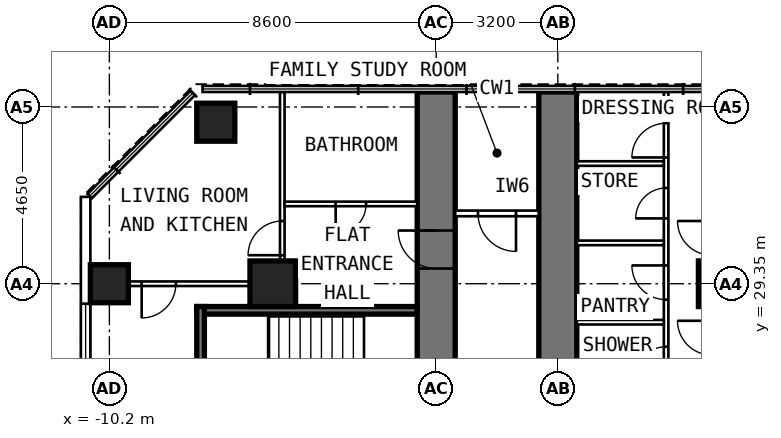
"""IFC4 building model, lengths in metres.
Left out: names, types, materials, properties, quantities, classifications, styles, units other than length and angle.
Written with IfcOpenShell. Run it as: python <this file> out.ifc"""

import sys

from ifc_helpers import new_model, si_unit, direction, frame, frame_2d, origin, origin_2d, place, context, subcontext, project, spatial, rectangle, extrude, element, fill, save


model = new_model("IFC4")
c1 = context("Model", 3, precision=1e-05, world=origin(), true_north=direction((0.0, 1.0)))
c2 = subcontext(c1, "Body", "Model", "MODEL_VIEW")
j1 = project(units=[si_unit("LENGTHUNIT", "METRE"), si_unit("PLANEANGLEUNIT", "RADIAN")], contexts=[c1])
p1 = place(None, origin())
s1 = spatial("IfcSite", under=j1, at=p1, CompositionType="ELEMENT")
p2 = place(p1, origin())
s2 = spatial("IfcBuilding", under=s1, at=p2, CompositionType="ELEMENT")
p3 = place(p2, frame((0.0, 0.0, 64.6)))
s3 = spatial("IfcBuildingStorey", under=s2, at=p3, CompositionType="ELEMENT", Elevation=64.6)
for number, where, z_axis, x_axis in (
    (1, (-10.2, 29.35, 0.0), (0.0, 0.0, 1.0), (0.0, 1.0, 0.0)),
    (2, (-7.4, 33.6, 0.0), (0.0, 0.0, 1.0), (0.0, 1.0, 0.0)),
):
    element("IfcColumn", number, at=place(p3, frame(where, z_axis=z_axis, x_axis=x_axis)), inside=s3, PredefinedType="COLUMN", context=c2, shape_type="SweptSolid", body=[
        extrude(rectangle(XDim=1.0, YDim=1.0, at=origin_2d()), origin(), (0.0, 0.0, 1.0), 3.6),
    ])
for number, where, z_axis, x_axis in (
    (3, (-5.9, 29.35, 0.0), (0.0, 0.0, 1.0), (0.0, 1.0, 0.0)),
    (4, (5.9, 29.35, 0.0), (0.0, 0.0, 1.0), (0.0, 1.0, 0.0)),
):
    element("IfcColumn", number, at=place(p3, frame(where, z_axis=z_axis, x_axis=x_axis)), inside=s3, PredefinedType="COLUMN", context=c2, shape_type="SweptSolid", body=[
        extrude(rectangle(XDim=1.2, YDim=1.2, at=origin_2d()), origin(), (0.0, 0.0, 1.0), 3.6),
    ])
p4 = place(p3, frame((-1.6, 23.65, 0.0), z_axis=(0.0, 0.0, 1.0), x_axis=(0.0, 1.0, 0.0)))
e5 = element("IfcWall", 5, at=p4, inside=s3, PredefinedType="SHEAR", context=c2, shape_type="SweptSolid", body=[
    extrude(rectangle(XDim=10.745, YDim=1.0, at=frame_2d((5.373, 0.0))), origin(), (0.0, 0.0, 1.0), 3.6),
])
p5 = place(p4, frame((6.1, 0.0, 0.0)))
e6 = element("IfcOpeningElement", 6, at=p5, cuts=e5, PredefinedType="OPENING", context=c2, shape_type="SweptSolid", body=[
    extrude(rectangle(XDim=1.0, YDim=2.1, at=frame_2d((0.5, 1.05))), frame((0.0, 0.512, 0.0), z_axis=(0.0, -1.0, 0.0), x_axis=(1.0, 0.0, 0.0)), (0.0, 0.0, 1.0), 1.024),
])
p6 = place(p4, frame((1.35, 0.0, 0.0)))
e7 = element("IfcOpeningElement", 7, at=p6, cuts=e5, PredefinedType="OPENING", context=c2, shape_type="SweptSolid", body=[
    extrude(rectangle(XDim=1.0, YDim=2.1, at=frame_2d((0.5, 1.05))), frame((0.0, 0.512, 0.0), z_axis=(0.0, -1.0, 0.0), x_axis=(1.0, 0.0, 0.0)), (0.0, 0.0, 1.0), 1.024),
])
p7 = place(p3, frame((1.6, 23.65, 0.0), z_axis=(0.0, 0.0, 1.0), x_axis=(0.0, 1.0, 0.0)))
e8 = element("IfcWall", 8, at=p7, inside=s3, PredefinedType="SHEAR", context=c2, shape_type="SweptSolid", body=[
    extrude(rectangle(XDim=10.745, YDim=1.0, at=frame_2d((5.373, 0.0))), origin(), (0.0, 0.0, 1.0), 3.6),
])
p8 = place(p7, frame((0.9, 0.0, 0.0)))
e9 = element("IfcOpeningElement", 9, at=p8, cuts=e8, PredefinedType="OPENING", context=c2, shape_type="SweptSolid", body=[
    extrude(rectangle(XDim=1.0, YDim=2.1, at=frame_2d((0.5, 1.05))), frame((0.0, 0.512, 0.0), z_axis=(0.0, -1.0, 0.0), x_axis=(1.0, 0.0, 0.0)), (0.0, 0.0, 1.0), 1.024),
])
p9 = place(p3, frame((-10.825, 6.148, 0.0), z_axis=(0.0, 0.0, 1.0), x_axis=(0.0, 1.0, 0.0)))
e10 = element("IfcWall", 10, at=p9, inside=s3, PredefinedType="SOLIDWALL", context=c2, shape_type="SweptSolid", body=[
    extrude(rectangle(XDim=25.487, YDim=0.25, at=frame_2d((12.744, 0.0))), origin(), (0.0, 0.0, 1.0), 3.35),
])
p10 = place(p9, frame((0.927, 0.0, 0.8)))
e11 = element("IfcOpeningElement", 11, at=p10, cuts=e10, PredefinedType="OPENING", context=c2, shape_type="SweptSolid", body=[
    extrude(rectangle(XDim=1.8, YDim=1.8, at=frame_2d((0.9, 0.9))), frame((0.0, 0.137, 0.0), z_axis=(0.0, -1.0, 0.0), x_axis=(1.0, 0.0, 0.0)), (0.0, 0.0, 1.0), 0.274),
])
p11 = place(p9, frame((3.777, 0.0, 0.8)))
e12 = element("IfcOpeningElement", 12, at=p11, cuts=e10, PredefinedType="OPENING", context=c2, shape_type="SweptSolid", body=[
    extrude(rectangle(XDim=1.8, YDim=1.8, at=frame_2d((0.9, 0.9))), frame((0.0, 0.137, 0.0), z_axis=(0.0, -1.0, 0.0), x_axis=(1.0, 0.0, 0.0)), (0.0, 0.0, 1.0), 0.274),
])
p12 = place(p9, frame((6.627, 0.0, 0.8)))
e13 = element("IfcOpeningElement", 13, at=p12, cuts=e10, PredefinedType="OPENING", context=c2, shape_type="SweptSolid", body=[
    extrude(rectangle(XDim=1.8, YDim=1.8, at=frame_2d((0.9, 0.9))), frame((0.0, 0.137, 0.0), z_axis=(0.0, -1.0, 0.0), x_axis=(1.0, 0.0, 0.0)), (0.0, 0.0, 1.0), 0.274),
])
p13 = place(p9, frame((9.477, 0.0, 0.8)))
e14 = element("IfcOpeningElement", 14, at=p13, cuts=e10, PredefinedType="OPENING", context=c2, shape_type="SweptSolid", body=[
    extrude(rectangle(XDim=1.8, YDim=1.8, at=frame_2d((0.9, 0.9))), frame((0.0, 0.137, 0.0), z_axis=(0.0, -1.0, 0.0), x_axis=(1.0, 0.0, 0.0)), (0.0, 0.0, 1.0), 0.274),
])
p14 = place(p9, frame((12.327, 0.0, 0.8)))
e15 = element("IfcOpeningElement", 15, at=p14, cuts=e10, PredefinedType="OPENING", context=c2, shape_type="SweptSolid", body=[
    extrude(rectangle(XDim=1.8, YDim=1.8, at=frame_2d((0.9, 0.9))), frame((0.0, 0.137, 0.0), z_axis=(0.0, -1.0, 0.0), x_axis=(1.0, 0.0, 0.0)), (0.0, 0.0, 1.0), 0.274),
])
p15 = place(p9, frame((15.177, 0.0, 0.8)))
e16 = element("IfcOpeningElement", 16, at=p15, cuts=e10, PredefinedType="OPENING", context=c2, shape_type="SweptSolid", body=[
    extrude(rectangle(XDim=1.8, YDim=1.8, at=frame_2d((0.9, 0.9))), frame((0.0, 0.137, 0.0), z_axis=(0.0, -1.0, 0.0), x_axis=(1.0, 0.0, 0.0)), (0.0, 0.0, 1.0), 0.274),
])
p16 = place(p9, frame((18.027, 0.0, 0.8)))
e17 = element("IfcOpeningElement", 17, at=p16, cuts=e10, PredefinedType="OPENING", context=c2, shape_type="SweptSolid", body=[
    extrude(rectangle(XDim=1.8, YDim=1.8, at=frame_2d((0.9, 0.9))), frame((0.0, 0.137, 0.0), z_axis=(0.0, -1.0, 0.0), x_axis=(1.0, 0.0, 0.0)), (0.0, 0.0, 1.0), 0.274),
])
p17 = place(p9, frame((20.877, 0.0, 0.8)))
e18 = element("IfcOpeningElement", 18, at=p17, cuts=e10, PredefinedType="OPENING", context=c2, shape_type="SweptSolid", body=[
    extrude(rectangle(XDim=1.8, YDim=1.8, at=frame_2d((0.9, 0.9))), frame((0.0, 0.137, 0.0), z_axis=(0.0, -1.0, 0.0), x_axis=(1.0, 0.0, 0.0)), (0.0, 0.0, 1.0), 0.274),
])
p18 = place(p3, frame((-5.71, 29.35, 0.0), z_axis=(0.0, 0.0, 1.0), x_axis=(-1.0, 0.0, 0.0)))
e19 = element("IfcWall", 19, at=p18, inside=s3, PredefinedType="PARTITIONING", context=c2, shape_type="SweptSolid", body=[
    extrude(rectangle(XDim=4.99, YDim=0.12, at=frame_2d((2.495, 0.0))), origin(), (0.0, 0.0, 1.0), 2.45),
])
p19 = place(p18, frame((2.74, 0.0, 0.0)))
e20 = element("IfcOpeningElement", 20, at=p19, cuts=e19, PredefinedType="OPENING", context=c2, shape_type="SweptSolid", body=[
    extrude(rectangle(XDim=0.9, YDim=2.1, at=frame_2d((0.45, 1.05))), frame((0.0, 0.072, 0.0), z_axis=(0.0, -1.0, 0.0), x_axis=(1.0, 0.0, 0.0)), (0.0, 0.0, 1.0), 0.144),
])
p20 = place(p3, frame((-5.65, 28.95, 0.0), z_axis=(0.0, 0.0, 1.0), x_axis=(0.0, 1.0, 0.0)))
e21 = element("IfcWall", 21, at=p20, inside=s3, PredefinedType="PARTITIONING", context=c2, shape_type="SweptSolid", body=[
    extrude(rectangle(XDim=5.445, YDim=0.12, at=frame_2d((2.723, 0.0))), origin(), (0.0, 0.0, 1.0), 3.35),
])
p21 = place(p20, frame((1.15, 0.0, 0.0)))
e22 = element("IfcOpeningElement", 22, at=p21, cuts=e21, PredefinedType="OPENING", context=c2, shape_type="SweptSolid", body=[
    extrude(rectangle(XDim=0.9, YDim=2.1, at=frame_2d((0.45, 1.05))), frame((0.0, 0.072, 0.0), z_axis=(0.0, -1.0, 0.0), x_axis=(1.0, 0.0, 0.0)), (0.0, 0.0, 1.0), 0.144),
])
p22 = place(p3, frame((-2.1, 31.45, 0.0), z_axis=(0.0, 0.0, 1.0), x_axis=(-1.0, 0.0, 0.0)))
e23 = element("IfcWall", 23, at=p22, inside=s3, PredefinedType="PARTITIONING", context=c2, shape_type="SweptSolid", body=[
    extrude(rectangle(XDim=3.49, YDim=0.12, at=frame_2d((1.745, 0.0))), origin(), (0.0, 0.0, 1.0), 3.35),
])
p23 = place(p22, frame((1.345, 0.0, 0.0)))
e24 = element("IfcOpeningElement", 24, at=p23, cuts=e23, PredefinedType="OPENING", context=c2, shape_type="SweptSolid", body=[
    extrude(rectangle(XDim=0.8, YDim=2.1, at=frame_2d((0.4, 1.05))), frame((0.0, 0.072, 0.0), z_axis=(0.0, -1.0, 0.0), x_axis=(1.0, 0.0, 0.0)), (0.0, 0.0, 1.0), 0.144),
])
p24 = place(p3, frame((4.45, 15.2, 0.0), z_axis=(0.0, 0.0, 1.0), x_axis=(0.0, 1.0, 0.0)))
e25 = element("IfcWall", 25, at=p24, inside=s3, PredefinedType="PARTITIONING", context=c2, shape_type="SweptSolid", body=[
    extrude(rectangle(XDim=19.195, YDim=0.12, at=frame_2d((9.598, 0.0))), origin(), (0.0, 0.0, 1.0), 3.35),
])
p25 = place(p24, frame((1.329, 0.0, 0.0)))
e26 = element("IfcOpeningElement", 26, at=p25, cuts=e25, PredefinedType="OPENING", context=c2, shape_type="SweptSolid", body=[
    extrude(rectangle(XDim=0.9, YDim=2.1, at=frame_2d((0.45, 1.05))), frame((0.0, 0.072, 0.0), z_axis=(0.0, -1.0, 0.0), x_axis=(1.0, 0.0, 0.0)), (0.0, 0.0, 1.0), 0.144),
])
p26 = place(p24, frame((3.336, 0.0, 0.0)))
e27 = element("IfcOpeningElement", 27, at=p26, cuts=e25, PredefinedType="OPENING", context=c2, shape_type="SweptSolid", body=[
    extrude(rectangle(XDim=0.8, YDim=2.1, at=frame_2d((0.4, 1.05))), frame((0.0, 0.072, 0.0), z_axis=(0.0, -1.0, 0.0), x_axis=(1.0, 0.0, 0.0)), (0.0, 0.0, 1.0), 0.144),
])
p27 = place(p24, frame((6.532, 0.0, 0.0)))
e28 = element("IfcOpeningElement", 28, at=p27, cuts=e25, PredefinedType="OPENING", context=c2, shape_type="SweptSolid", body=[
    extrude(rectangle(XDim=0.8, YDim=2.1, at=frame_2d((0.4, 1.05))), frame((0.0, 0.072, 0.0), z_axis=(0.0, -1.0, 0.0), x_axis=(1.0, 0.0, 0.0)), (0.0, 0.0, 1.0), 0.144),
])
p28 = place(p24, frame((9.5, 0.0, 0.0)))
e29 = element("IfcOpeningElement", 29, at=p28, cuts=e25, PredefinedType="OPENING", context=c2, shape_type="SweptSolid", body=[
    extrude(rectangle(XDim=0.9, YDim=2.1, at=frame_2d((0.45, 1.05))), frame((0.0, 0.072, 0.0), z_axis=(0.0, -1.0, 0.0), x_axis=(1.0, 0.0, 0.0)), (0.0, 0.0, 1.0), 0.144),
])
p29 = place(p24, frame((11.694, 0.0, 0.0)))
e30 = element("IfcOpeningElement", 30, at=p29, cuts=e25, PredefinedType="OPENING", context=c2, shape_type="SweptSolid", body=[
    extrude(rectangle(XDim=0.8, YDim=2.1, at=frame_2d((0.4, 1.05))), frame((0.0, 0.072, 0.0), z_axis=(0.0, -1.0, 0.0), x_axis=(1.0, 0.0, 0.0)), (0.0, 0.0, 1.0), 0.144),
])
p30 = place(p24, frame((13.731, 0.0, 0.0)))
e31 = element("IfcOpeningElement", 31, at=p30, cuts=e25, PredefinedType="OPENING", context=c2, shape_type="SweptSolid", body=[
    extrude(rectangle(XDim=0.9, YDim=2.1, at=frame_2d((0.45, 1.05))), frame((0.0, 0.072, 0.0), z_axis=(0.0, -1.0, 0.0), x_axis=(1.0, 0.0, 0.0)), (0.0, 0.0, 1.0), 0.144),
])
p31 = place(p24, frame((15.869, 0.0, 0.0)))
e32 = element("IfcOpeningElement", 32, at=p31, cuts=e25, PredefinedType="OPENING", context=c2, shape_type="SweptSolid", body=[
    extrude(rectangle(XDim=0.8, YDim=2.1, at=frame_2d((0.4, 1.05))), frame((0.0, 0.072, 0.0), z_axis=(0.0, -1.0, 0.0), x_axis=(1.0, 0.0, 0.0)), (0.0, 0.0, 1.0), 0.144),
])
p32 = place(p24, frame((17.472, 0.0, 0.0)))
e33 = element("IfcOpeningElement", 33, at=p32, cuts=e25, PredefinedType="OPENING", context=c2, shape_type="SweptSolid", body=[
    extrude(rectangle(XDim=0.9, YDim=2.1, at=frame_2d((0.45, 1.05))), frame((0.0, 0.072, 0.0), z_axis=(0.0, -1.0, 0.0), x_axis=(1.0, 0.0, 0.0)), (0.0, 0.0, 1.0), 0.144),
])
for number, where, z_axis, x_axis in (
    (34, (2.1, 28.337, 0.0), (0.0, 0.0, 1.0), (1.0, 0.0, 0.0)),
    (35, (2.1, 30.425, 0.0), (0.0, 0.0, 1.0), (1.0, 0.0, 0.0)),
    (36, (2.1, 32.512, 0.0), (0.0, 0.0, 1.0), (1.0, 0.0, 0.0)),
):
    element("IfcWall", number, at=place(p3, frame(where, z_axis=z_axis, x_axis=x_axis)), inside=s3, PredefinedType="PARTITIONING", context=c2, shape_type="SweptSolid", body=[
        extrude(rectangle(XDim=2.29, YDim=0.12, at=frame_2d((1.145, 0.0))), origin(), (0.0, 0.0, 1.0), 3.35),
    ])
p33 = place(p3, frame((1.1, 31.2, 0.0), z_axis=(0.0, 0.0, 1.0), x_axis=(-1.0, 0.0, 0.0)))
e37 = element("IfcWall", 37, at=p33, inside=s3, PredefinedType="PARTITIONING", context=c2, shape_type="SweptSolid", body=[
    extrude(rectangle(XDim=2.2, YDim=0.15, at=frame_2d((1.1, 0.0))), origin(), (0.0, 0.0, 1.0), 3.35),
])
p34 = place(p33, frame((0.6, 0.0, 0.0)))
e38 = element("IfcOpeningElement", 38, at=p34, cuts=e37, PredefinedType="OPENING", context=c2, shape_type="SweptSolid", body=[
    extrude(rectangle(XDim=1.0, YDim=2.1, at=frame_2d((0.5, 1.05))), frame((0.0, 0.087, 0.0), z_axis=(0.0, -1.0, 0.0), x_axis=(1.0, 0.0, 0.0)), (0.0, 0.0, 1.0), 0.174),
])
p35 = place(p3, frame((-2.1, 28.65, 0.0), z_axis=(0.0, 0.0, 1.0), x_axis=(-1.0, 0.0, 0.0)))
e39 = element("IfcWall", 39, at=p35, inside=s3, PredefinedType="SHEAR", context=c2, shape_type="SweptSolid", body=[
    extrude(rectangle(XDim=5.8, YDim=0.2, at=frame_2d((2.9, 0.0))), origin(), (0.0, 0.0, 1.0), 3.33),
])
p36 = place(p3, frame((-7.8, 24.75, 0.0), z_axis=(0.0, 0.0, 1.0), x_axis=(0.0, 1.0, 0.0)))
e40 = element("IfcWall", 40, at=p36, inside=s3, PredefinedType="SHEAR", context=c2, shape_type="SweptSolid", body=[
    extrude(rectangle(XDim=4.0, YDim=0.2, at=frame_2d((2.0, 0.0))), origin(), (0.0, 0.0, 1.0), 3.33),
])
p37 = place(p17, origin())
e41 = element("IfcWindow", 41, at=p37, inside=s3, PartitioningType="SINGLE_PANEL", PredefinedType="WINDOW", context=c2, shape_type="SweptSolid", body=[
    extrude(rectangle(XDim=1.8, YDim=1.8, at=frame_2d((0.9, 0.9))), frame((0.0, 0.03, 0.0), z_axis=(0.0, -1.0, 0.0), x_axis=(1.0, 0.0, 0.0)), (0.0, 0.0, 1.0), 0.06),
])
fill(e18, e41)
p38 = place(p19, origin())
e42 = element("IfcDoor", 42, at=p38, inside=s3, OperationType="SINGLE_SWING_RIGHT", PredefinedType="DOOR", context=c2, shape_type="SweptSolid", body=[
    extrude(rectangle(XDim=0.9, YDim=2.1, at=frame_2d((0.45, 1.05))), frame((0.0, 0.025, 0.0), z_axis=(0.0, -1.0, 0.0), x_axis=(1.0, 0.0, 0.0)), (0.0, 0.0, 1.0), 0.05),
])
fill(e20, e42)
p39 = place(p21, origin())
e43 = element("IfcDoor", 43, at=p39, inside=s3, OperationType="SINGLE_SWING_LEFT", PredefinedType="DOOR", context=c2, shape_type="SweptSolid", body=[
    extrude(rectangle(XDim=0.9, YDim=2.1, at=frame_2d((0.45, 1.05))), frame((0.0, 0.025, 0.0), z_axis=(0.0, -1.0, 0.0), x_axis=(1.0, 0.0, 0.0)), (0.0, 0.0, 1.0), 0.05),
])
fill(e22, e43)
p40 = place(p23, origin())
e44 = element("IfcDoor", 44, at=p40, inside=s3, OperationType="SINGLE_SWING_RIGHT", PredefinedType="DOOR", context=c2, shape_type="SweptSolid", body=[
    extrude(rectangle(XDim=0.8, YDim=2.1, at=frame_2d((0.4, 1.05))), frame((0.0, 0.025, 0.0), z_axis=(0.0, -1.0, 0.0), x_axis=(1.0, 0.0, 0.0)), (0.0, 0.0, 1.0), 0.05),
])
fill(e24, e44)
p41 = place(p5, origin())
e45 = element("IfcDoor", 45, at=p41, inside=s3, OperationType="SINGLE_SWING_RIGHT", PredefinedType="DOOR", context=c2, shape_type="SweptSolid", body=[
    extrude(rectangle(XDim=1.0, YDim=2.1, at=frame_2d((0.5, 1.05))), frame((0.0, 0.25, 0.0), z_axis=(0.0, -1.0, 0.0), x_axis=(1.0, 0.0, 0.0)), (0.0, 0.0, 1.0), 0.5),
])
fill(e6, e45)
p42 = place(p29, origin())
e46 = element("IfcDoor", 46, at=p42, inside=s3, OperationType="SINGLE_SWING_LEFT", PredefinedType="DOOR", context=c2, shape_type="SweptSolid", body=[
    extrude(rectangle(XDim=0.8, YDim=2.1, at=frame_2d((0.4, 1.05))), frame((0.0, 0.025, 0.0), z_axis=(0.0, -1.0, 0.0), x_axis=(1.0, 0.0, 0.0)), (0.0, 0.0, 1.0), 0.05),
])
fill(e30, e46)
p43 = place(p30, origin())
e47 = element("IfcDoor", 47, at=p43, inside=s3, OperationType="SINGLE_SWING_RIGHT", PredefinedType="DOOR", context=c2, shape_type="SweptSolid", body=[
    extrude(rectangle(XDim=0.9, YDim=2.1, at=frame_2d((0.45, 1.05))), frame((0.0, 0.025, 0.0), z_axis=(0.0, -1.0, 0.0), x_axis=(1.0, 0.0, 0.0)), (0.0, 0.0, 1.0), 0.05),
])
fill(e31, e47)
p44 = place(p31, origin())
e48 = element("IfcDoor", 48, at=p44, inside=s3, OperationType="SINGLE_SWING_LEFT", PredefinedType="DOOR", context=c2, shape_type="SweptSolid", body=[
    extrude(rectangle(XDim=0.8, YDim=2.1, at=frame_2d((0.4, 1.05))), frame((0.0, 0.025, 0.0), z_axis=(0.0, -1.0, 0.0), x_axis=(1.0, 0.0, 0.0)), (0.0, 0.0, 1.0), 0.05),
])
fill(e32, e48)
p45 = place(p32, origin())
e49 = element("IfcDoor", 49, at=p45, inside=s3, OperationType="SINGLE_SWING_LEFT", PredefinedType="DOOR", context=c2, shape_type="SweptSolid", body=[
    extrude(rectangle(XDim=0.9, YDim=2.1, at=frame_2d((0.45, 1.05))), frame((0.0, 0.025, 0.0), z_axis=(0.0, -1.0, 0.0), x_axis=(1.0, 0.0, 0.0)), (0.0, 0.0, 1.0), 0.05),
])
fill(e33, e49)
p46 = place(p34, origin())
e50 = element("IfcDoor", 50, at=p46, inside=s3, OperationType="SINGLE_SWING_LEFT", PredefinedType="DOOR", context=c2, shape_type="SweptSolid", body=[
    extrude(rectangle(XDim=1.0, YDim=2.1, at=frame_2d((0.5, 1.05))), frame((0.0, 0.025, 0.0), z_axis=(0.0, -1.0, 0.0), x_axis=(1.0, 0.0, 0.0)), (0.0, 0.0, 1.0), 0.05),
])
fill(e38, e50)
save(model, sys.argv[1])
